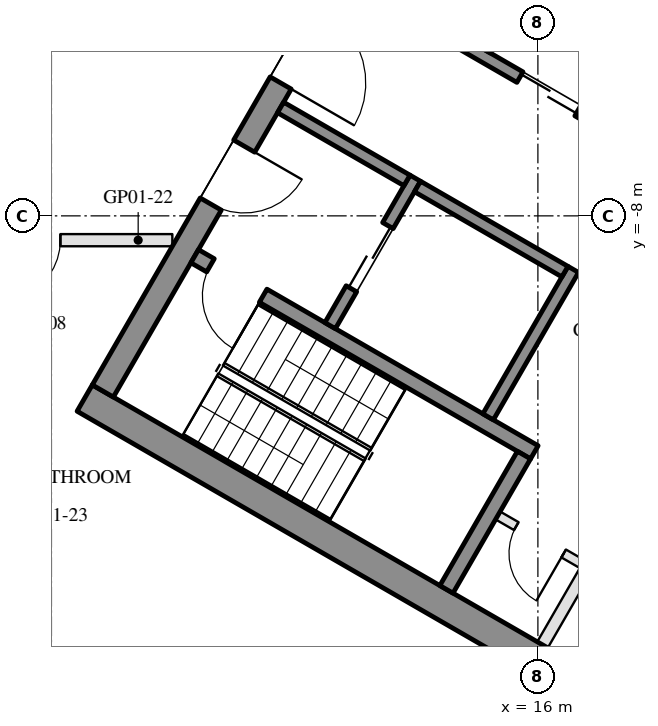
"""IFC4 building model, lengths in metres.
Left out: names, types, materials, properties, quantities, classifications, styles, units other than length and angle.
Written with IfcOpenShell. Run it as: python <this file> out.ifc"""

import sys

from ifc_helpers import new_model, si_unit, direction, frame, frame_2d, origin, place, context, subcontext, project, spatial, rectangle, extrude, element, fill, save


model = new_model("IFC4")
c1 = context("Model", 3, precision=1e-05, world=origin(), true_north=direction((0.0, 1.0)))
c2 = subcontext(c1, "Body", "Model", "MODEL_VIEW")
j1 = project(units=[si_unit("LENGTHUNIT", "METRE"), si_unit("PLANEANGLEUNIT", "RADIAN")], contexts=[c1])
p1 = place(None, origin())
s1 = spatial("IfcSite", under=j1, at=p1, CompositionType="ELEMENT")
p2 = place(p1, origin())
s2 = spatial("IfcBuilding", under=s1, at=p2, CompositionType="ELEMENT")
p3 = place(p2, frame((0.0, 0.0, 50.2)))
s3 = spatial("IfcBuildingStorey", under=s2, at=p3, CompositionType="ELEMENT", Elevation=50.2)
for number, where, z_axis, x_axis in (
    (1, (8.547, -10.997, 0.0), (0.0, 0.0, 1.0), (0.866, -0.5, 0.0)),
    (2, (13.797, -1.903, 0.0), (0.0, 0.0, 1.0), (0.866, -0.5, 0.0)),
):
    element("IfcWall", number, at=place(p3, frame(where, z_axis=z_axis, x_axis=x_axis)), inside=s3, PredefinedType="SHEAR", context=c2, shape_type="SweptSolid", body=[
        extrude(rectangle(XDim=14.837, YDim=0.5, at=frame_2d((7.418, 0.0))), origin(), (0.0, 0.0, 1.0), 3.5),
    ])
p4 = place(p3, frame((8.845, -10.88, 0.0), z_axis=(0.0, 0.0, 1.0), x_axis=(0.500004234368, 0.866022959057, 0.0)))
e3 = element("IfcWall", 3, at=p4, inside=s3, PredefinedType="SHEAR", context=c2, shape_type="SweptSolid", body=[
    extrude(rectangle(XDim=10.0, YDim=0.4, at=frame_2d((5.0, 0.0))), origin(), (0.0, 0.0, 1.0), 3.5),
])
p5 = place(p4, frame((3.55, 0.0, 0.0)))
e4 = element("IfcOpeningElement", 4, at=p5, cuts=e3, PredefinedType="OPENING", context=c2, shape_type="SweptSolid", body=[
    extrude(rectangle(XDim=1.1, YDim=2.1, at=frame_2d((0.55, 1.05))), frame((0.0, 0.21, 0.0), z_axis=(0.0, -1.0, 0.0), x_axis=(1.0, 0.0, 0.0)), (0.0, 0.0, 1.0), 0.42),
])
p6 = place(p4, frame((5.85, 0.0, 0.0)))
e5 = element("IfcOpeningElement", 5, at=p6, cuts=e3, PredefinedType="OPENING", context=c2, shape_type="SweptSolid", body=[
    extrude(rectangle(XDim=1.4, YDim=2.1, at=frame_2d((0.7, 1.05))), frame((0.0, 0.21, 0.0), z_axis=(0.0, -1.0, 0.0), x_axis=(1.0, 0.0, 0.0)), (0.0, 0.0, 1.0), 0.42),
])
p7 = place(p3, frame((10.356, -8.664, 0.0), z_axis=(0.0, 0.0, 1.0), x_axis=(0.866028629588, -0.499994412703, 0.0)))
e6 = element("IfcWall", 6, at=p7, inside=s3, PredefinedType="SHEAR", context=c2, shape_type="SweptSolid", body=[
    extrude(rectangle(XDim=6.45, YDim=0.25, at=frame_2d((3.225, 0.0))), origin(), (0.0, 0.0, 1.0), 3.5),
])
p8 = place(p7, frame((0.3, 0.0, 0.0)))
e7 = element("IfcOpeningElement", 7, at=p8, cuts=e6, PredefinedType="OPENING", context=c2, shape_type="SweptSolid", body=[
    extrude(rectangle(XDim=1.0, YDim=2.1, at=frame_2d((0.5, 1.05))), frame((0.0, 0.135, 0.0), z_axis=(0.0, -1.0, 0.0), x_axis=(1.0, 0.0, 0.0)), (0.0, 0.0, 1.0), 0.27),
])
p9 = place(p3, frame((14.496, -14.143, 0.0), z_axis=(0.0, 0.0, 1.0), x_axis=(0.500062241894, 0.865989465428, 0.0)))
e8 = element("IfcWall", 8, at=p9, inside=s3, PredefinedType="SHEAR", context=c2, shape_type="SweptSolid", body=[
    extrude(rectangle(XDim=2.55, YDim=0.25, at=frame_2d((1.275, 0.0))), origin(), (0.0, 0.0, 1.0), 3.5),
])
p10 = place(p3, frame((15.181, -11.305, 0.0), z_axis=(0.0, 0.0, 1.0), x_axis=(0.49994636267, 0.866056369097, 0.0)))
e9 = element("IfcWall", 9, at=p10, inside=s3, PredefinedType="SHEAR", context=c2, shape_type="SweptSolid", body=[
    extrude(rectangle(XDim=2.8, YDim=0.2, at=frame_2d((1.4, 0.0))), origin(), (0.0, 0.0, 1.0), 3.5),
])
p11 = place(p3, frame((12.583, -9.805, 0.0), z_axis=(0.0, 0.0, 1.0), x_axis=(0.49994636267, 0.866056369097, 0.0)))
e10 = element("IfcWall", 10, at=p11, inside=s3, PredefinedType="SHEAR", context=c2, shape_type="SweptSolid", body=[
    extrude(rectangle(XDim=2.8, YDim=0.2, at=frame_2d((1.4, 0.0))), origin(), (0.0, 0.0, 1.0), 3.5),
])
p12 = place(p11, frame((0.7, 0.0, 0.0)))
e11 = element("IfcOpeningElement", 11, at=p12, cuts=e10, PredefinedType="OPENING", context=c2, shape_type="SweptSolid", body=[
    extrude(rectangle(XDim=1.2, YDim=2.1, at=frame_2d((0.6, 1.05))), frame((0.0, 0.11, 0.0), z_axis=(0.0, -1.0, 0.0), x_axis=(1.0, 0.0, 0.0)), (0.0, 0.0, 1.0), 0.22),
])
p13 = place(p3, frame((11.768, -6.217, 0.0), z_axis=(0.0, 0.0, 1.0), x_axis=(0.866050077142, -0.499957262057, 0.0)))
e12 = element("IfcWall", 12, at=p13, inside=s3, PredefinedType="SHEAR", context=c2, shape_type="SweptSolid", body=[
    extrude(rectangle(XDim=2.4, YDim=0.2, at=frame_2d((1.2, 0.0))), origin(), (0.0, 0.0, 1.0), 3.5),
])
p14 = place(p3, frame((14.02, -7.517, 0.0), z_axis=(0.0, 0.0, 1.0), x_axis=(0.866034573852, -0.49998411664, 0.0)))
e13 = element("IfcWall", 13, at=p14, inside=s3, PredefinedType="SHEAR", context=c2, shape_type="SweptSolid", body=[
    extrude(rectangle(XDim=2.8, YDim=0.2, at=frame_2d((1.4, 0.0))), origin(), (0.0, 0.0, 1.0), 3.5),
])
p15 = place(p3, frame((12.968, -4.138, 0.0), z_axis=(0.0, 0.0, 1.0), x_axis=(0.866028328073, -0.49999493495, 0.0)))
e14 = element("IfcWall", 14, at=p15, inside=s3, PredefinedType="SHEAR", context=c2, shape_type="SweptSolid", body=[
    extrude(rectangle(XDim=10.16, YDim=0.2, at=frame_2d((5.08, 0.0))), origin(), (0.0, 0.0, 1.0), 3.5),
])
p16 = place(p15, frame((0.62, 0.0, 0.0)))
e15 = element("IfcOpeningElement", 15, at=p16, cuts=e14, PredefinedType="OPENING", context=c2, shape_type="SweptSolid", body=[
    extrude(rectangle(XDim=1.1, YDim=2.1, at=frame_2d((0.55, 1.05))), frame((0.0, 0.11, 0.0), z_axis=(0.0, -1.0, 0.0), x_axis=(1.0, 0.0, 0.0)), (0.0, 0.0, 1.0), 0.22),
])
p17 = place(p15, frame((3.16, 0.0, 0.0)))
e16 = element("IfcOpeningElement", 16, at=p17, cuts=e14, PredefinedType="OPENING", context=c2, shape_type="SweptSolid", body=[
    extrude(rectangle(XDim=1.1, YDim=2.1, at=frame_2d((0.55, 1.05))), frame((0.0, 0.11, 0.0), z_axis=(0.0, -1.0, 0.0), x_axis=(1.0, 0.0, 0.0)), (0.0, 0.0, 1.0), 0.22),
])
p18 = place(p15, frame((5.7, 0.0, 0.0)))
e17 = element("IfcOpeningElement", 17, at=p18, cuts=e14, PredefinedType="OPENING", context=c2, shape_type="SweptSolid", body=[
    extrude(rectangle(XDim=1.1, YDim=2.1, at=frame_2d((0.55, 1.05))), frame((0.0, 0.11, 0.0), z_axis=(0.0, -1.0, 0.0), x_axis=(1.0, 0.0, 0.0)), (0.0, 0.0, 1.0), 0.22),
])
p19 = place(p15, frame((8.24, 0.0, 0.0)))
e18 = element("IfcOpeningElement", 18, at=p19, cuts=e14, PredefinedType="OPENING", context=c2, shape_type="SweptSolid", body=[
    extrude(rectangle(XDim=1.1, YDim=2.1, at=frame_2d((0.55, 1.05))), frame((0.0, 0.11, 0.0), z_axis=(0.0, -1.0, 0.0), x_axis=(1.0, 0.0, 0.0)), (0.0, 0.0, 1.0), 0.22),
])
p20 = place(p3, frame((15.131, -5.272, 0.0), z_axis=(0.0, 0.0, 1.0), x_axis=(0.499972520799, 0.866041268327, 0.0)))
e19 = element("IfcWall", 19, at=p20, inside=s3, PredefinedType="SHEAR", context=c2, shape_type="SweptSolid", body=[
    extrude(rectangle(XDim=2.0, YDim=0.2, at=frame_2d((1.0, 0.0))), origin(), (0.0, 0.0, 1.0), 3.5),
])
p21 = place(p3, frame((16.076, -15.055, 0.0), z_axis=(0.0, 0.0, 1.0), x_axis=(0.499995103361, 0.866028230842, 0.0)))
e20 = element("IfcWall", 20, at=p21, inside=s3, PredefinedType="PARTITIONING", context=c2, shape_type="SweptSolid", body=[
    extrude(rectangle(XDim=5.4, YDim=0.2, at=frame_2d((2.7, 0.0))), origin(), (0.0, 0.0, 1.0), 3.5),
])
p22 = place(p21, frame((1.913, 0.0, 0.0)))
e21 = element("IfcOpeningElement", 21, at=p22, cuts=e20, PredefinedType="OPENING", context=c2, shape_type="SweptSolid", body=[
    extrude(rectangle(XDim=0.9, YDim=2.1, at=frame_2d((0.45, 1.05))), frame((0.0, 0.11, 0.0), z_axis=(0.0, -1.0, 0.0), x_axis=(1.0, 0.0, 0.0)), (0.0, 0.0, 1.0), 0.22),
])
p23 = place(p21, frame((3.788, 0.0, 0.0)))
e22 = element("IfcOpeningElement", 22, at=p23, cuts=e20, PredefinedType="OPENING", context=c2, shape_type="SweptSolid", body=[
    extrude(rectangle(XDim=0.9, YDim=2.1, at=frame_2d((0.45, 1.05))), frame((0.0, 0.11, 0.0), z_axis=(0.0, -1.0, 0.0), x_axis=(1.0, 0.0, 0.0)), (0.0, 0.0, 1.0), 0.22),
])
p24 = place(p3, frame((15.342, -12.928, 0.0), z_axis=(0.0, 0.0, 1.0), x_axis=(0.865989903783, -0.500061482766, 0.0)))
e23 = element("IfcWall", 23, at=p24, inside=s3, PredefinedType="PARTITIONING", context=c2, shape_type="SweptSolid", body=[
    extrude(rectangle(XDim=1.6, YDim=0.15, at=frame_2d((0.8, 0.0))), origin(), (0.0, 0.0, 1.0), 3.5),
])
p25 = place(p24, frame((0.35, 0.0, 0.0)))
e24 = element("IfcOpeningElement", 24, at=p25, cuts=e23, PredefinedType="OPENING", context=c2, shape_type="SweptSolid", body=[
    extrude(rectangle(XDim=0.9, YDim=2.1, at=frame_2d((0.45, 1.05))), frame((0.0, 0.085, 0.0), z_axis=(0.0, -1.0, 0.0), x_axis=(1.0, 0.0, 0.0)), (0.0, 0.0, 1.0), 0.17),
])
p26 = place(p3, frame((9.988, -8.4, 0.0), z_axis=(0.0, 0.0, 1.0), x_axis=(-1.0, 0.0, 0.0)))
e25 = element("IfcWall", 25, at=p26, inside=s3, PredefinedType="PARTITIONING", context=c2, shape_type="SweptSolid", body=[
    extrude(rectangle(XDim=4.683, YDim=0.2, at=frame_2d((2.342, 0.0))), origin(), (0.0, 0.0, 1.0), 2.95),
])
p27 = place(p26, frame((1.842, 0.0, 0.0)))
e26 = element("IfcOpeningElement", 26, at=p27, cuts=e25, PredefinedType="OPENING", context=c2, shape_type="SweptSolid", body=[
    extrude(rectangle(XDim=1.0, YDim=2.1, at=frame_2d((0.5, 1.05))), frame((0.0, 0.11, 0.0), z_axis=(0.0, -1.0, 0.0), x_axis=(1.0, 0.0, 0.0)), (0.0, 0.0, 1.0), 0.22),
])
p28 = place(p12, origin())
e27 = element("IfcDoor", 27, at=p28, inside=s3, OperationType="DOUBLE_DOOR_SLIDING", PredefinedType="DOOR", context=c2, shape_type="SweptSolid", body=[
    extrude(rectangle(XDim=1.2, YDim=2.1, at=frame_2d((0.6, 1.05))), frame((0.0, 0.025, 0.0), z_axis=(0.0, -1.0, 0.0), x_axis=(1.0, 0.0, 0.0)), (0.0, 0.0, 1.0), 0.05),
])
fill(e11, e27)
p29 = place(p25, frame((0.9, 0.0, 0.0), z_axis=(0.0, 0.0, 1.0), x_axis=(-1.0, 0.0, 0.0)))
e28 = element("IfcDoor", 28, at=p29, inside=s3, OperationType="SINGLE_SWING_LEFT", PredefinedType="DOOR", context=c2, shape_type="SweptSolid", body=[
    extrude(rectangle(XDim=0.9, YDim=2.1, at=frame_2d((0.45, 1.05))), frame((0.0, 0.025, 0.0), z_axis=(0.0, -1.0, 0.0), x_axis=(1.0, 0.0, 0.0)), (0.0, 0.0, 1.0), 0.05),
])
fill(e24, e28)
p30 = place(p17, origin())
e29 = element("IfcDoor", 29, at=p30, inside=s3, OperationType="DOUBLE_DOOR_SLIDING", PredefinedType="DOOR", context=c2, shape_type="SweptSolid", body=[
    extrude(rectangle(XDim=1.1, YDim=2.1, at=frame_2d((0.55, 1.05))), frame((0.0, 0.025, 0.0), z_axis=(0.0, -1.0, 0.0), x_axis=(1.0, 0.0, 0.0)), (0.0, 0.0, 1.0), 0.05),
])
fill(e16, e29)
p31 = place(p5, frame((1.1, 0.0, 0.0), z_axis=(0.0, 0.0, 1.0), x_axis=(-1.0, 0.0, 0.0)))
e30 = element("IfcDoor", 30, at=p31, inside=s3, OperationType="SINGLE_SWING_LEFT", PredefinedType="DOOR", context=c2, shape_type="SweptSolid", body=[
    extrude(rectangle(XDim=1.1, YDim=2.1, at=frame_2d((0.55, 1.05))), frame((0.0, 0.025, 0.0), z_axis=(0.0, -1.0, 0.0), x_axis=(1.0, 0.0, 0.0)), (0.0, 0.0, 1.0), 0.05),
])
fill(e4, e30)
p32 = place(p6, frame((1.4, 0.0, 0.0), z_axis=(0.0, 0.0, 1.0), x_axis=(-1.0, 0.0, 0.0)))
e31 = element("IfcDoor", 31, at=p32, inside=s3, OperationType="DOUBLE_DOOR_SINGLE_SWING", PredefinedType="DOOR", context=c2, shape_type="SweptSolid", body=[
    extrude(rectangle(XDim=1.4, YDim=2.1, at=frame_2d((0.7, 1.05))), frame((0.0, 0.025, 0.0), z_axis=(0.0, -1.0, 0.0), x_axis=(1.0, 0.0, 0.0)), (0.0, 0.0, 1.0), 0.05),
])
fill(e5, e31)
p33 = place(p8, frame((1.0, 0.0, 0.0), z_axis=(0.0, 0.0, 1.0), x_axis=(-1.0, 0.0, 0.0)))
e32 = element("IfcDoor", 32, at=p33, inside=s3, OperationType="SINGLE_SWING_LEFT", PredefinedType="DOOR", context=c2, shape_type="SweptSolid", body=[
    extrude(rectangle(XDim=1.0, YDim=2.1, at=frame_2d((0.5, 1.05))), frame((0.0, 0.025, 0.0), z_axis=(0.0, -1.0, 0.0), x_axis=(1.0, 0.0, 0.0)), (0.0, 0.0, 1.0), 0.05),
])
fill(e7, e32)
p34 = place(p27, origin())
e33 = element("IfcDoor", 33, at=p34, inside=s3, OperationType="SINGLE_SWING_RIGHT", PredefinedType="DOOR", context=c2, shape_type="SweptSolid", body=[
    extrude(rectangle(XDim=1.0, YDim=2.1, at=frame_2d((0.5, 1.05))), frame((0.0, 0.025, 0.0), z_axis=(0.0, -1.0, 0.0), x_axis=(1.0, 0.0, 0.0)), (0.0, 0.0, 1.0), 0.05),
])
fill(e26, e33)
save(model, sys.argv[1])
